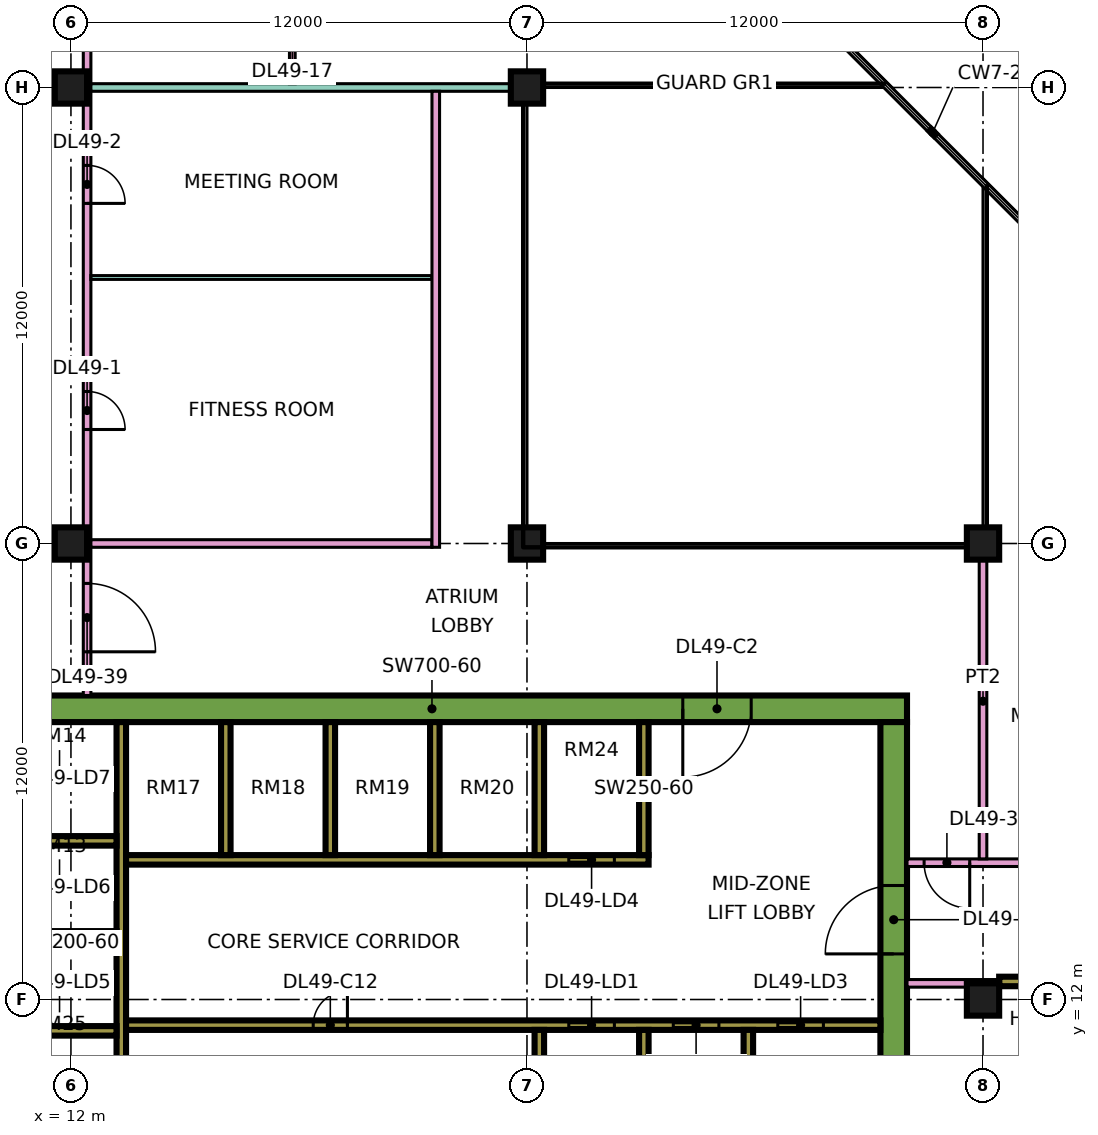
"""IFC4 building model, lengths in metres.
Left out: names, types, materials, properties, quantities, classifications, styles, units other than length and angle.
Written with IfcOpenShell. Run it as: python <this file> out.ifc"""

import sys

from ifc_helpers import new_model, si_unit, direction, frame, frame_2d, origin, origin_2d, place, context, subcontext, project, spatial, rectangle, extrude, element, fill, save


model = new_model("IFC4")
c1 = context("Model", 3, precision=1e-05, world=origin(), true_north=direction((0.0, 1.0)))
c2 = subcontext(c1, "Body", "Model", "MODEL_VIEW")
j1 = project(units=[si_unit("LENGTHUNIT", "METRE"), si_unit("PLANEANGLEUNIT", "RADIAN")], contexts=[c1])
p1 = place(None, origin())
s1 = spatial("IfcSite", under=j1, at=p1, CompositionType="ELEMENT")
p2 = place(p1, origin())
s2 = spatial("IfcBuilding", under=s1, at=p2, CompositionType="ELEMENT")
p3 = place(p2, frame((0.0, 0.0, 211.65)))
s3 = spatial("IfcBuildingStorey", under=s2, at=p3, CompositionType="ELEMENT", Elevation=211.65)
for number, where, z_axis, x_axis in (
    (1, (12.0, 24.0, 0.0), (0.0, 0.0, 1.0), (1.0, 0.0, 0.0)),
    (2, (12.0, 36.0, 0.0), (0.0, 0.0, 1.0), (1.0, 0.0, 0.0)),
    (3, (24.0, 24.0, 0.0), (0.0, 0.0, 1.0), (1.0, 0.0, 0.0)),
    (4, (24.0, 36.0, 0.0), (0.0, 0.0, 1.0), (1.0, 0.0, 0.0)),
    (5, (36.0, 12.0, 0.0), (0.0, 0.0, 1.0), (1.0, 0.0, 0.0)),
    (6, (36.0, 24.0, 0.0), (0.0, 0.0, 1.0), (1.0, 0.0, 0.0)),
):
    element("IfcColumn", number, at=place(p3, frame(where, z_axis=z_axis, x_axis=x_axis)), inside=s3, PredefinedType="COLUMN", context=c2, shape_type="SweptSolid", body=[
        extrude(rectangle(XDim=0.85, YDim=0.85, at=origin_2d()), origin(), (0.0, 0.0, 1.0), 3.75),
    ])
p4 = place(p3, frame((9.0, 19.65, 0.0), z_axis=(0.0, 0.0, 1.0), x_axis=(1.0, 0.0, 0.0)))
e7 = element("IfcWall", 7, at=p4, inside=s3, PredefinedType="SHEAR", context=c2, shape_type="SweptSolid", body=[
    extrude(rectangle(XDim=25.0, YDim=0.7, at=frame_2d((12.5, 0.0))), origin(), (0.0, 0.0, 1.0), 3.75),
])
p5 = place(p4, frame((19.1, 0.0, 0.0)))
e8 = element("IfcOpeningElement", 8, at=p5, cuts=e7, PredefinedType="OPENING", context=c2, shape_type="SweptSolid", body=[
    extrude(rectangle(XDim=1.8, YDim=2.4, at=frame_2d((0.9, 1.2))), frame((0.0, 0.36, 0.0), z_axis=(0.0, -1.0, 0.0), x_axis=(1.0, 0.0, 0.0)), (0.0, 0.0, 1.0), 0.72),
])
p6 = place(p3, frame((33.65, 7.7, 0.0), z_axis=(0.0, 0.0, 1.0), x_axis=(0.0, 1.0, 0.0)))
e9 = element("IfcWall", 9, at=p6, inside=s3, PredefinedType="SHEAR", context=c2, shape_type="SweptSolid", body=[
    extrude(rectangle(XDim=11.6, YDim=0.7, at=frame_2d((5.8, 0.0))), origin(), (0.0, 0.0, 1.0), 3.75),
])
p7 = place(p6, frame((5.5, 0.0, 0.0)))
e10 = element("IfcOpeningElement", 10, at=p7, cuts=e9, PredefinedType="OPENING", context=c2, shape_type="SweptSolid", body=[
    extrude(rectangle(XDim=1.8, YDim=2.4, at=frame_2d((0.9, 1.2))), frame((0.0, 0.36, 0.0), z_axis=(0.0, -1.0, 0.0), x_axis=(1.0, 0.0, 0.0)), (0.0, 0.0, 1.0), 0.72),
])
p8 = place(p3, frame((13.325, 7.7, 0.0), z_axis=(0.0, 0.0, 1.0), x_axis=(0.0, 1.0, 0.0)))
e11 = element("IfcWall", 11, at=p8, inside=s3, PredefinedType="SHEAR", context=c2, shape_type="SweptSolid", body=[
    extrude(rectangle(XDim=11.6, YDim=0.25, at=frame_2d((5.8, 0.0))), origin(), (0.0, 0.0, 1.0), 3.75),
])
p9 = place(p3, frame((13.45, 11.325, 0.0), z_axis=(0.0, 0.0, 1.0), x_axis=(1.0, 0.0, 0.0)))
e12 = element("IfcWall", 12, at=p9, inside=s3, PredefinedType="SHEAR", context=c2, shape_type="SweptSolid", body=[
    extrude(rectangle(XDim=19.85, YDim=0.25, at=frame_2d((9.925, 0.0))), origin(), (0.0, 0.0, 1.0), 3.75),
])
p10 = place(p9, frame((11.65, 0.0, 0.0)))
e13 = element("IfcOpeningElement", 13, at=p10, cuts=e12, PredefinedType="OPENING", context=c2, shape_type="SweptSolid", body=[
    extrude(rectangle(XDim=1.2, YDim=2.2, at=frame_2d((0.6, 1.1))), frame((0.0, 0.135, 0.0), z_axis=(0.0, -1.0, 0.0), x_axis=(1.0, 0.0, 0.0)), (0.0, 0.0, 1.0), 0.27),
])
p11 = place(p9, frame((14.4, 0.0, 0.0)))
e14 = element("IfcOpeningElement", 14, at=p11, cuts=e12, PredefinedType="OPENING", context=c2, shape_type="SweptSolid", body=[
    extrude(rectangle(XDim=1.2, YDim=2.2, at=frame_2d((0.6, 1.1))), frame((0.0, 0.135, 0.0), z_axis=(0.0, -1.0, 0.0), x_axis=(1.0, 0.0, 0.0)), (0.0, 0.0, 1.0), 0.27),
])
p12 = place(p9, frame((17.15, 0.0, 0.0)))
e15 = element("IfcOpeningElement", 15, at=p12, cuts=e12, PredefinedType="OPENING", context=c2, shape_type="SweptSolid", body=[
    extrude(rectangle(XDim=1.2, YDim=2.2, at=frame_2d((0.6, 1.1))), frame((0.0, 0.135, 0.0), z_axis=(0.0, -1.0, 0.0), x_axis=(1.0, 0.0, 0.0)), (0.0, 0.0, 1.0), 0.27),
])
p13 = place(p9, frame((4.925, 0.0, 0.0)))
e16 = element("IfcOpeningElement", 16, at=p13, cuts=e12, PredefinedType="OPENING", context=c2, shape_type="SweptSolid", body=[
    extrude(rectangle(XDim=0.9, YDim=2.1, at=frame_2d((0.45, 1.05))), frame((0.0, 0.135, 0.0), z_axis=(0.0, -1.0, 0.0), x_axis=(1.0, 0.0, 0.0)), (0.0, 0.0, 1.0), 0.27),
])
p14 = place(p3, frame((13.45, 15.675, 0.0), z_axis=(0.0, 0.0, 1.0), x_axis=(1.0, 0.0, 0.0)))
e17 = element("IfcWall", 17, at=p14, inside=s3, PredefinedType="SHEAR", context=c2, shape_type="SweptSolid", body=[
    extrude(rectangle(XDim=13.75, YDim=0.25, at=frame_2d((6.875, 0.0))), origin(), (0.0, 0.0, 1.0), 3.75),
])
p15 = place(p14, frame((11.65, 0.0, 0.0)))
e18 = element("IfcOpeningElement", 18, at=p15, cuts=e17, PredefinedType="OPENING", context=c2, shape_type="SweptSolid", body=[
    extrude(rectangle(XDim=1.2, YDim=2.2, at=frame_2d((0.6, 1.1))), frame((0.0, 0.135, 0.0), z_axis=(0.0, -1.0, 0.0), x_axis=(1.0, 0.0, 0.0)), (0.0, 0.0, 1.0), 0.27),
])
for number, where, z_axis, x_axis in (
    (19, (10.2, 11.175, 0.0), (0.0, 0.0, 1.0), (1.0, 0.0, 0.0)),
    (20, (10.2, 13.675, 0.0), (0.0, 0.0, 1.0), (1.0, 0.0, 0.0)),
    (21, (10.2, 16.175, 0.0), (0.0, 0.0, 1.0), (1.0, 0.0, 0.0)),
):
    element("IfcWall", number, at=place(p3, frame(where, z_axis=z_axis, x_axis=x_axis)), inside=s3, PredefinedType="SHEAR", context=c2, shape_type="SweptSolid", body=[
        extrude(rectangle(XDim=3.0, YDim=0.25, at=frame_2d((1.5, 0.0))), origin(), (0.0, 0.0, 1.0), 3.75),
    ])
for number, where, z_axis, x_axis in (
    (22, (24.325, 7.7, 0.0), (0.0, 0.0, 1.0), (0.0, 1.0, 0.0)),
    (23, (27.075, 7.7, 0.0), (0.0, 0.0, 1.0), (0.0, 1.0, 0.0)),
    (24, (29.825, 7.7, 0.0), (0.0, 0.0, 1.0), (0.0, 1.0, 0.0)),
    (25, (16.075, 15.8, 0.0), (0.0, 0.0, 1.0), (0.0, 1.0, 0.0)),
    (26, (18.825, 15.8, 0.0), (0.0, 0.0, 1.0), (0.0, 1.0, 0.0)),
    (27, (21.575, 15.8, 0.0), (0.0, 0.0, 1.0), (0.0, 1.0, 0.0)),
    (28, (24.325, 15.8, 0.0), (0.0, 0.0, 1.0), (0.0, 1.0, 0.0)),
    (29, (27.075, 15.8, 0.0), (0.0, 0.0, 1.0), (0.0, 1.0, 0.0)),
):
    element("IfcWall", number, at=place(p3, frame(where, z_axis=z_axis, x_axis=x_axis)), inside=s3, PredefinedType="SHEAR", context=c2, shape_type="SweptSolid", body=[
        extrude(rectangle(XDim=3.5, YDim=0.25, at=frame_2d((1.75, 0.0))), origin(), (0.0, 0.0, 1.0), 3.75),
    ])
p16 = place(p3, frame((36.425, 12.475, 0.0), z_axis=(0.0, 0.0, 1.0), x_axis=(1.0, 0.0, 0.0)))
e30 = element("IfcWall", 30, at=p16, inside=s3, PredefinedType="SHEAR", context=c2, shape_type="SweptSolid", body=[
    extrude(rectangle(XDim=4.225, YDim=0.25, at=frame_2d((2.112, 0.0))), origin(), (0.0, 0.0, 1.0), 3.75),
])
p17 = place(p16, frame((1.95, 0.0, 0.0)))
e31 = element("IfcOpeningElement", 31, at=p17, cuts=e30, PredefinedType="OPENING", context=c2, shape_type="SweptSolid", body=[
    extrude(rectangle(XDim=1.1, YDim=2.2, at=frame_2d((0.55, 1.1))), frame((0.0, 0.135, 0.0), z_axis=(0.0, -1.0, 0.0), x_axis=(1.0, 0.0, 0.0)), (0.0, 0.0, 1.0), 0.27),
])
p18 = place(p3, frame((-1.447, 12.553, 0.0), z_axis=(0.0, 0.0, 1.0), x_axis=(0.707106781187, -0.707106781187, 0.0)))
e32 = element("IfcWall", 32, at=p18, inside=s3, PredefinedType="SOLIDWALL", context=c2, shape_type="SweptSolid", body=[
    extrude(rectangle(XDim=19.799, YDim=0.15, at=frame_2d((9.899, 0.0))), origin(), (0.0, 0.0, 1.0), 3.35),
])
p19 = place(p18, frame((2.212, 0.0, 0.45)))
e33 = element("IfcOpeningElement", 33, at=p19, cuts=e32, PredefinedType="OPENING", context=c2, shape_type="SweptSolid", body=[
    extrude(rectangle(XDim=3.0, YDim=2.4, at=frame_2d((1.5, 1.2))), frame((0.0, 0.085, 0.0), z_axis=(0.0, -1.0, 0.0), x_axis=(1.0, 0.0, 0.0)), (0.0, 0.0, 1.0), 0.17),
])
p20 = place(p18, frame((10.216, 0.0, 0.45)))
e34 = element("IfcOpeningElement", 34, at=p20, cuts=e32, PredefinedType="OPENING", context=c2, shape_type="SweptSolid", body=[
    extrude(rectangle(XDim=3.0, YDim=2.4, at=frame_2d((1.5, 1.2))), frame((0.0, 0.085, 0.0), z_axis=(0.0, -1.0, 0.0), x_axis=(1.0, 0.0, 0.0)), (0.0, 0.0, 1.0), 0.17),
])
p21 = place(p3, frame((12.425, 20.0, 0.0), z_axis=(0.0, 0.0, 1.0), x_axis=(0.0, 1.0, 0.0)))
e35 = element("IfcWall", 35, at=p21, inside=s3, PredefinedType="PARTITIONING", context=c2, shape_type="SweptSolid", body=[
    extrude(rectangle(XDim=42.926, YDim=0.2, at=frame_2d((21.463, 0.0))), origin(), (0.0, 0.0, 1.0), 3.35),
])
p22 = place(p21, frame((7.0, 0.0, 0.0)))
e36 = element("IfcOpeningElement", 36, at=p22, cuts=e35, PredefinedType="OPENING", context=c2, shape_type="SweptSolid", body=[
    extrude(rectangle(XDim=1.0, YDim=2.1, at=frame_2d((0.5, 1.05))), frame((0.0, 0.11, 0.0), z_axis=(0.0, -1.0, 0.0), x_axis=(1.0, 0.0, 0.0)), (0.0, 0.0, 1.0), 0.22),
])
p23 = place(p21, frame((12.95, 0.0, 0.0)))
e37 = element("IfcOpeningElement", 37, at=p23, cuts=e35, PredefinedType="OPENING", context=c2, shape_type="SweptSolid", body=[
    extrude(rectangle(XDim=1.0, YDim=2.1, at=frame_2d((0.5, 1.05))), frame((0.0, 0.11, 0.0), z_axis=(0.0, -1.0, 0.0), x_axis=(1.0, 0.0, 0.0)), (0.0, 0.0, 1.0), 0.22),
])
p24 = place(p21, frame((23.35, 0.0, 0.0)))
e38 = element("IfcOpeningElement", 38, at=p24, cuts=e35, PredefinedType="OPENING", context=c2, shape_type="SweptSolid", body=[
    extrude(rectangle(XDim=1.0, YDim=2.1, at=frame_2d((0.5, 1.05))), frame((0.0, 0.11, 0.0), z_axis=(0.0, -1.0, 0.0), x_axis=(1.0, 0.0, 0.0)), (0.0, 0.0, 1.0), 0.22),
])
p25 = place(p21, frame((35.2, 0.0, 0.0)))
e39 = element("IfcOpeningElement", 39, at=p25, cuts=e35, PredefinedType="OPENING", context=c2, shape_type="SweptSolid", body=[
    extrude(rectangle(XDim=1.0, YDim=2.1, at=frame_2d((0.5, 1.05))), frame((0.0, 0.11, 0.0), z_axis=(0.0, -1.0, 0.0), x_axis=(1.0, 0.0, 0.0)), (0.0, 0.0, 1.0), 0.22),
])
p26 = place(p21, frame((1.15, 0.0, 0.0)))
e40 = element("IfcOpeningElement", 40, at=p26, cuts=e35, PredefinedType="OPENING", context=c2, shape_type="SweptSolid", body=[
    extrude(rectangle(XDim=1.8, YDim=2.1, at=frame_2d((0.9, 1.05))), frame((0.0, 0.11, 0.0), z_axis=(0.0, -1.0, 0.0), x_axis=(1.0, 0.0, 0.0)), (0.0, 0.0, 1.0), 0.22),
])
p27 = place(p21, frame((28.6, 0.0, 0.0)))
e41 = element("IfcOpeningElement", 41, at=p27, cuts=e35, PredefinedType="OPENING", context=c2, shape_type="SweptSolid", body=[
    extrude(rectangle(XDim=1.8, YDim=2.1, at=frame_2d((0.9, 1.05))), frame((0.0, 0.11, 0.0), z_axis=(0.0, -1.0, 0.0), x_axis=(1.0, 0.0, 0.0)), (0.0, 0.0, 1.0), 0.22),
])
p28 = place(p3, frame((12.525, 24.0, 0.0), z_axis=(0.0, 0.0, 1.0), x_axis=(1.0, 0.0, 0.0)))
e42 = element("IfcWall", 42, at=p28, inside=s3, PredefinedType="PARTITIONING", context=c2, shape_type="SweptSolid", body=[
    extrude(rectangle(XDim=8.975, YDim=0.2, at=frame_2d((4.488, 0.0))), origin(), (0.0, 0.0, 1.0), 3.35),
])
p29 = place(p3, frame((12.525, 31.0, 0.0), z_axis=(0.0, 0.0, 1.0), x_axis=(1.0, 0.0, 0.0)))
e43 = element("IfcWall", 43, at=p29, inside=s3, PredefinedType="PARTITIONING", context=c2, shape_type="SweptSolid", body=[
    extrude(rectangle(XDim=8.975, YDim=0.1, at=frame_2d((4.488, 0.0))), origin(), (0.0, 0.0, 1.0), 3.35),
])
p30 = place(p3, frame((12.525, 36.0, 0.0), z_axis=(0.0, 0.0, 1.0), x_axis=(1.0, 0.0, 0.0)))
e44 = element("IfcWall", 44, at=p30, inside=s3, PredefinedType="PARTITIONING", context=c2, shape_type="SweptSolid", body=[
    extrude(rectangle(XDim=11.475, YDim=0.2, at=frame_2d((5.738, 0.0))), origin(), (0.0, 0.0, 1.0), 3.35),
])
p31 = place(p3, frame((17.825, 36.1, 0.0), z_axis=(0.0, 0.0, 1.0), x_axis=(0.0, 1.0, 0.0)))
e45 = element("IfcWall", 45, at=p31, inside=s3, PredefinedType="PARTITIONING", context=c2, shape_type="SweptSolid", body=[
    extrude(rectangle(XDim=6.575, YDim=0.15, at=frame_2d((3.288, 0.0))), origin(), (0.0, 0.0, 1.0), 3.35),
])
p32 = place(p31, frame((4.35, 0.0, 0.0)))
e46 = element("IfcOpeningElement", 46, at=p32, cuts=e45, PredefinedType="OPENING", context=c2, shape_type="SweptSolid", body=[
    extrude(rectangle(XDim=0.8, YDim=2.1, at=frame_2d((0.4, 1.05))), frame((0.0, 0.085, 0.0), z_axis=(0.0, -1.0, 0.0), x_axis=(1.0, 0.0, 0.0)), (0.0, 0.0, 1.0), 0.17),
])
p33 = place(p31, frame((0.95, 0.0, 0.0)))
e47 = element("IfcOpeningElement", 47, at=p33, cuts=e45, PredefinedType="OPENING", context=c2, shape_type="SweptSolid", body=[
    extrude(rectangle(XDim=0.9, YDim=2.1, at=frame_2d((0.45, 1.05))), frame((0.0, 0.085, 0.0), z_axis=(0.0, -1.0, 0.0), x_axis=(1.0, 0.0, 0.0)), (0.0, 0.0, 1.0), 0.17),
])
p34 = place(p3, frame((21.6, 23.9, 0.0), z_axis=(0.0, 0.0, 1.0), x_axis=(0.0, 1.0, 0.0)))
e48 = element("IfcWall", 48, at=p34, inside=s3, PredefinedType="PARTITIONING", context=c2, shape_type="SweptSolid", body=[
    extrude(rectangle(XDim=12.0, YDim=0.2, at=frame_2d((6.0, 0.0))), origin(), (0.0, 0.0, 1.0), 3.35),
])
p35 = place(p3, frame((34.0, 12.425, 0.0), z_axis=(0.0, 0.0, 1.0), x_axis=(1.0, 0.0, 0.0)))
e49 = element("IfcWall", 49, at=p35, inside=s3, PredefinedType="PARTITIONING", context=c2, shape_type="SweptSolid", body=[
    extrude(rectangle(XDim=2.426, YDim=0.2, at=frame_2d((1.213, 0.0))), origin(), (0.0, 0.0, 1.0), 3.35),
])
p36 = place(p3, frame((34.0, 15.6, 0.0), z_axis=(0.0, 0.0, 1.0), x_axis=(1.0, 0.0, 0.0)))
e50 = element("IfcWall", 50, at=p36, inside=s3, PredefinedType="PARTITIONING", context=c2, shape_type="SweptSolid", body=[
    extrude(rectangle(XDim=10.35, YDim=0.2, at=frame_2d((5.175, 0.0))), origin(), (0.0, 0.0, 1.0), 3.35),
])
p37 = place(p36, frame((5.6, 0.0, 0.0)))
e51 = element("IfcOpeningElement", 51, at=p37, cuts=e50, PredefinedType="OPENING", context=c2, shape_type="SweptSolid", body=[
    extrude(rectangle(XDim=1.0, YDim=2.1, at=frame_2d((0.5, 1.05))), frame((0.0, 0.11, 0.0), z_axis=(0.0, -1.0, 0.0), x_axis=(1.0, 0.0, 0.0)), (0.0, 0.0, 1.0), 0.22),
])
p38 = place(p36, frame((0.45, 0.0, 0.0)))
e52 = element("IfcOpeningElement", 52, at=p38, cuts=e50, PredefinedType="OPENING", context=c2, shape_type="SweptSolid", body=[
    extrude(rectangle(XDim=1.2, YDim=2.1, at=frame_2d((0.6, 1.05))), frame((0.0, 0.11, 0.0), z_axis=(0.0, -1.0, 0.0), x_axis=(1.0, 0.0, 0.0)), (0.0, 0.0, 1.0), 0.22),
])
p39 = place(p3, frame((36.0, 15.7, 0.0), z_axis=(0.0, 0.0, 1.0), x_axis=(0.0, 1.0, 0.0)))
e53 = element("IfcWall", 53, at=p39, inside=s3, PredefinedType="PARTITIONING", context=c2, shape_type="SweptSolid", body=[
    extrude(rectangle(XDim=8.3, YDim=0.2, at=frame_2d((4.15, 0.0))), origin(), (0.0, 0.0, 1.0), 3.35),
])
p40 = place(p10, origin())
e54 = element("IfcDoor", 54, at=p40, inside=s3, OperationType="DOUBLE_DOOR_SLIDING", PredefinedType="DOOR", context=c2, shape_type="SweptSolid", body=[
    extrude(rectangle(XDim=1.2, YDim=2.2, at=frame_2d((0.6, 1.1))), frame((0.0, 0.025, 0.0), z_axis=(0.0, -1.0, 0.0), x_axis=(1.0, 0.0, 0.0)), (0.0, 0.0, 1.0), 0.05),
])
fill(e13, e54)
p41 = place(p11, origin())
e55 = element("IfcDoor", 55, at=p41, inside=s3, OperationType="DOUBLE_DOOR_SLIDING", PredefinedType="DOOR", context=c2, shape_type="SweptSolid", body=[
    extrude(rectangle(XDim=1.2, YDim=2.2, at=frame_2d((0.6, 1.1))), frame((0.0, 0.025, 0.0), z_axis=(0.0, -1.0, 0.0), x_axis=(1.0, 0.0, 0.0)), (0.0, 0.0, 1.0), 0.05),
])
fill(e14, e55)
p42 = place(p12, origin())
e56 = element("IfcDoor", 56, at=p42, inside=s3, OperationType="DOUBLE_DOOR_SLIDING", PredefinedType="DOOR", context=c2, shape_type="SweptSolid", body=[
    extrude(rectangle(XDim=1.2, YDim=2.2, at=frame_2d((0.6, 1.1))), frame((0.0, 0.025, 0.0), z_axis=(0.0, -1.0, 0.0), x_axis=(1.0, 0.0, 0.0)), (0.0, 0.0, 1.0), 0.05),
])
fill(e15, e56)
p43 = place(p15, origin())
e57 = element("IfcDoor", 57, at=p43, inside=s3, OperationType="DOUBLE_DOOR_SLIDING", PredefinedType="DOOR", context=c2, shape_type="SweptSolid", body=[
    extrude(rectangle(XDim=1.2, YDim=2.2, at=frame_2d((0.6, 1.1))), frame((0.0, 0.025, 0.0), z_axis=(0.0, -1.0, 0.0), x_axis=(1.0, 0.0, 0.0)), (0.0, 0.0, 1.0), 0.05),
])
fill(e18, e57)
p44 = place(p7, origin())
e58 = element("IfcDoor", 58, at=p44, inside=s3, OperationType="DOUBLE_DOOR_SINGLE_SWING", PredefinedType="DOOR", context=c2, shape_type="SweptSolid", body=[
    extrude(rectangle(XDim=1.8, YDim=2.4, at=frame_2d((0.9, 1.2))), frame((0.0, 0.025, 0.0), z_axis=(0.0, -1.0, 0.0), x_axis=(1.0, 0.0, 0.0)), (0.0, 0.0, 1.0), 0.05),
])
fill(e10, e58)
p45 = place(p5, frame((1.8, 0.0, 0.0), z_axis=(0.0, 0.0, 1.0), x_axis=(-1.0, 0.0, 0.0)))
e59 = element("IfcDoor", 59, at=p45, inside=s3, OperationType="DOUBLE_DOOR_SINGLE_SWING", PredefinedType="DOOR", context=c2, shape_type="SweptSolid", body=[
    extrude(rectangle(XDim=1.8, YDim=2.4, at=frame_2d((0.9, 1.2))), frame((0.0, 0.025, 0.0), z_axis=(0.0, -1.0, 0.0), x_axis=(1.0, 0.0, 0.0)), (0.0, 0.0, 1.0), 0.05),
])
fill(e8, e59)
p46 = place(p13, frame((0.9, 0.0, 0.0), z_axis=(0.0, 0.0, 1.0), x_axis=(-1.0, 0.0, 0.0)))
e60 = element("IfcDoor", 60, at=p46, inside=s3, OperationType="SINGLE_SWING_RIGHT", PredefinedType="DOOR", context=c2, shape_type="SweptSolid", body=[
    extrude(rectangle(XDim=0.9, YDim=2.1, at=frame_2d((0.45, 1.05))), frame((0.0, 0.025, 0.0), z_axis=(0.0, -1.0, 0.0), x_axis=(1.0, 0.0, 0.0)), (0.0, 0.0, 1.0), 0.05),
])
fill(e16, e60)
p47 = place(p22, frame((1.0, 0.0, 0.0), z_axis=(0.0, 0.0, 1.0), x_axis=(-1.0, 0.0, 0.0)))
e61 = element("IfcDoor", 61, at=p47, inside=s3, OperationType="SINGLE_SWING_LEFT", PredefinedType="DOOR", context=c2, shape_type="SweptSolid", body=[
    extrude(rectangle(XDim=1.0, YDim=2.1, at=frame_2d((0.5, 1.05))), frame((0.0, 0.025, 0.0), z_axis=(0.0, -1.0, 0.0), x_axis=(1.0, 0.0, 0.0)), (0.0, 0.0, 1.0), 0.05),
])
fill(e36, e61)
p48 = place(p23, frame((1.0, 0.0, 0.0), z_axis=(0.0, 0.0, 1.0), x_axis=(-1.0, 0.0, 0.0)))
e62 = element("IfcDoor", 62, at=p48, inside=s3, OperationType="SINGLE_SWING_LEFT", PredefinedType="DOOR", context=c2, shape_type="SweptSolid", body=[
    extrude(rectangle(XDim=1.0, YDim=2.1, at=frame_2d((0.5, 1.05))), frame((0.0, 0.025, 0.0), z_axis=(0.0, -1.0, 0.0), x_axis=(1.0, 0.0, 0.0)), (0.0, 0.0, 1.0), 0.05),
])
fill(e37, e62)
p49 = place(p38, origin())
e63 = element("IfcDoor", 63, at=p49, inside=s3, OperationType="SINGLE_SWING_RIGHT", PredefinedType="DOOR", context=c2, shape_type="SweptSolid", body=[
    extrude(rectangle(XDim=1.2, YDim=2.1, at=frame_2d((0.6, 1.05))), frame((0.0, 0.025, 0.0), z_axis=(0.0, -1.0, 0.0), x_axis=(1.0, 0.0, 0.0)), (0.0, 0.0, 1.0), 0.05),
])
fill(e52, e63)
p50 = place(p26, frame((1.8, 0.0, 0.0), z_axis=(0.0, 0.0, 1.0), x_axis=(-1.0, 0.0, 0.0)))
e64 = element("IfcDoor", 64, at=p50, inside=s3, OperationType="DOUBLE_DOOR_SINGLE_SWING", PredefinedType="DOOR", context=c2, shape_type="SweptSolid", body=[
    extrude(rectangle(XDim=1.8, YDim=2.1, at=frame_2d((0.9, 1.05))), frame((0.0, 0.025, 0.0), z_axis=(0.0, -1.0, 0.0), x_axis=(1.0, 0.0, 0.0)), (0.0, 0.0, 1.0), 0.05),
])
fill(e40, e64)
save(model, sys.argv[1])
